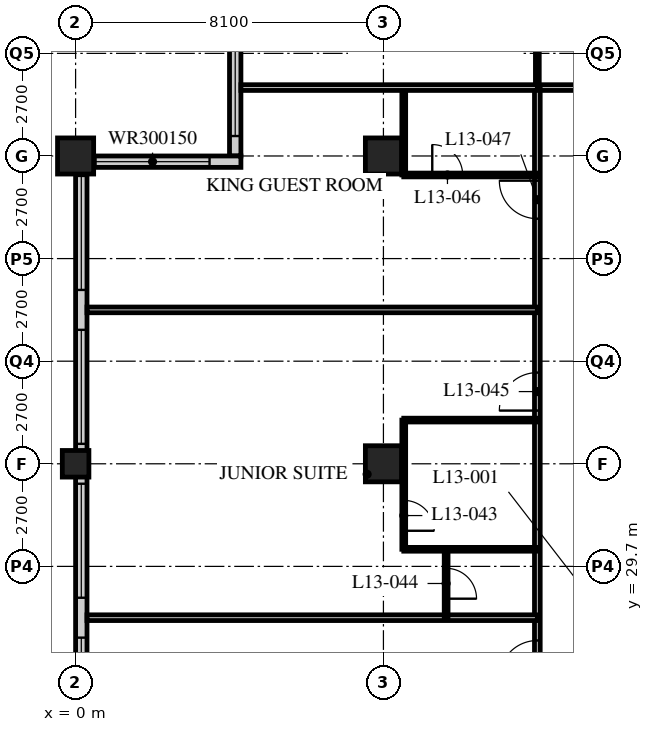
"""IFC4 building model, lengths in metres.
Left out: names, types, materials, properties, quantities, classifications, styles, units other than length and angle.
Written with IfcOpenShell. Run it as: python <this file> out.ifc"""

import sys

from ifc_helpers import new_model, si_unit, direction, frame, frame_2d, origin, origin_2d, place, context, subcontext, project, spatial, rectangle, hollow_rectangle, extrude, element, fill, save


model = new_model("IFC4")
c1 = context("Model", 3, precision=1e-05, world=origin(), true_north=direction((0.0, 1.0)))
c2 = subcontext(c1, "Body", "Model", "MODEL_VIEW")
j1 = project(units=[si_unit("LENGTHUNIT", "METRE"), si_unit("PLANEANGLEUNIT", "RADIAN")], contexts=[c1])
p1 = place(None, origin())
s1 = spatial("IfcSite", under=j1, at=p1, CompositionType="ELEMENT")
p2 = place(p1, origin())
s2 = spatial("IfcBuilding", under=s1, at=p2, CompositionType="ELEMENT")
p3 = place(p2, frame((0.0, 0.0, 56.8)))
s3 = spatial("IfcBuildingStorey", under=s2, at=p3, CompositionType="ELEMENT", Elevation=56.8)
p4 = place(p3, frame((0.0, 32.4, 0.0), z_axis=(0.0, 0.0, 1.0), x_axis=(1.0, 0.0, 0.0)))
e1 = element("IfcColumn", 1, at=p4, inside=s3, PredefinedType="COLUMN", context=c2, shape_type="SweptSolid", body=[
    extrude(hollow_rectangle(XDim=0.7, YDim=0.7, WallThickness=0.06, at=origin_2d()), origin(), (0.0, 0.0, 1.0), 3.4),
])
for number, where, z_axis, x_axis in (
    (2, (0.0, 40.5, 0.0), (0.0, 0.0, 1.0), (1.0, 0.0, 0.0)),
    (3, (8.1, 32.4, 0.0), (0.0, 0.0, 1.0), (1.0, 0.0, 0.0)),
    (4, (8.1, 40.5, 0.0), (0.0, 0.0, 1.0), (1.0, 0.0, 0.0)),
):
    element("IfcColumn", number, at=place(p3, frame(where, z_axis=z_axis, x_axis=x_axis)), inside=s3, PredefinedType="COLUMN", context=c2, shape_type="SweptSolid", body=[
        extrude(hollow_rectangle(XDim=0.95, YDim=0.95, WallThickness=0.095, at=origin_2d()), origin(), (0.0, 0.0, 1.0), 3.4),
    ])
p5 = place(p3, frame((4.2, 44.25, 0.0), z_axis=(0.0, 0.0, 1.0), x_axis=(0.0, -1.0, 0.0)))
e5 = element("IfcWall", 5, at=p5, inside=s3, PredefinedType="SOLIDWALL", context=c2, shape_type="SweptSolid", body=[
    extrude(rectangle(XDim=3.75, YDim=0.3, at=frame_2d((1.875, 0.0))), origin(), (0.0, 0.0, 1.0), 3.19),
])
p6 = place(p5, frame((0.225, 0.0, 0.9)))
e6 = element("IfcOpeningElement", 6, at=p6, cuts=e5, PredefinedType="OPENING", context=c2, shape_type="SweptSolid", body=[
    extrude(rectangle(XDim=3.0, YDim=1.5, at=frame_2d((1.5, 0.75))), frame((0.0, 0.16, 0.0), z_axis=(0.0, -1.0, 0.0), x_axis=(1.0, 0.0, 0.0)), (0.0, 0.0, 1.0), 0.32),
])
p7 = place(p3, frame((4.35, 40.35, 0.0), z_axis=(0.0, 0.0, 1.0), x_axis=(-1.0, 0.0, 0.0)))
e7 = element("IfcWall", 7, at=p7, inside=s3, PredefinedType="SOLIDWALL", context=c2, shape_type="SweptSolid", body=[
    extrude(rectangle(XDim=4.35, YDim=0.3, at=frame_2d((2.175, 0.0))), origin(), (0.0, 0.0, 1.0), 3.19),
])
p8 = place(p7, frame((0.825, 0.0, 0.9)))
e8 = element("IfcOpeningElement", 8, at=p8, cuts=e7, PredefinedType="OPENING", context=c2, shape_type="SweptSolid", body=[
    extrude(rectangle(XDim=3.0, YDim=1.5, at=frame_2d((1.5, 0.75))), frame((0.0, 0.16, 0.0), z_axis=(0.0, -1.0, 0.0), x_axis=(1.0, 0.0, 0.0)), (0.0, 0.0, 1.0), 0.32),
])
p9 = place(p3, frame((0.15, 40.2, 0.0), z_axis=(0.0, 0.0, 1.0), x_axis=(0.0, -1.0, 0.0)))
e9 = element("IfcWall", 9, at=p9, inside=s3, PredefinedType="SOLIDWALL", context=c2, shape_type="SweptSolid", body=[
    extrude(rectangle(XDim=32.1, YDim=0.3, at=frame_2d((16.05, 0.0))), origin(), (0.0, 0.0, 1.0), 3.19),
])
p10 = place(p9, frame((0.225, 0.0, 0.9)))
e10 = element("IfcOpeningElement", 10, at=p10, cuts=e9, PredefinedType="OPENING", context=c2, shape_type="SweptSolid", body=[
    extrude(rectangle(XDim=3.0, YDim=2.0, at=frame_2d((1.5, 1.0))), frame((0.0, 0.16, 0.0), z_axis=(0.0, -1.0, 0.0), x_axis=(1.0, 0.0, 0.0)), (0.0, 0.0, 1.0), 0.32),
])
p11 = place(p9, frame((4.275, 0.0, 0.9)))
e11 = element("IfcOpeningElement", 11, at=p11, cuts=e9, PredefinedType="OPENING", context=c2, shape_type="SweptSolid", body=[
    extrude(rectangle(XDim=3.0, YDim=2.0, at=frame_2d((1.5, 1.0))), frame((0.0, 0.16, 0.0), z_axis=(0.0, -1.0, 0.0), x_axis=(1.0, 0.0, 0.0)), (0.0, 0.0, 1.0), 0.32),
])
p12 = place(p9, frame((8.325, 0.0, 0.9)))
e12 = element("IfcOpeningElement", 12, at=p12, cuts=e9, PredefinedType="OPENING", context=c2, shape_type="SweptSolid", body=[
    extrude(rectangle(XDim=3.0, YDim=2.0, at=frame_2d((1.5, 1.0))), frame((0.0, 0.16, 0.0), z_axis=(0.0, -1.0, 0.0), x_axis=(1.0, 0.0, 0.0)), (0.0, 0.0, 1.0), 0.32),
])
p13 = place(p9, frame((12.375, 0.0, 0.9)))
e13 = element("IfcOpeningElement", 13, at=p13, cuts=e9, PredefinedType="OPENING", context=c2, shape_type="SweptSolid", body=[
    extrude(rectangle(XDim=3.0, YDim=2.0, at=frame_2d((1.5, 1.0))), frame((0.0, 0.16, 0.0), z_axis=(0.0, -1.0, 0.0), x_axis=(1.0, 0.0, 0.0)), (0.0, 0.0, 1.0), 0.32),
])
p14 = place(p9, frame((16.425, 0.0, 0.9)))
e14 = element("IfcOpeningElement", 14, at=p14, cuts=e9, PredefinedType="OPENING", context=c2, shape_type="SweptSolid", body=[
    extrude(rectangle(XDim=3.0, YDim=2.0, at=frame_2d((1.5, 1.0))), frame((0.0, 0.16, 0.0), z_axis=(0.0, -1.0, 0.0), x_axis=(1.0, 0.0, 0.0)), (0.0, 0.0, 1.0), 0.32),
])
p15 = place(p9, frame((20.475, 0.0, 0.9)))
e15 = element("IfcOpeningElement", 15, at=p15, cuts=e9, PredefinedType="OPENING", context=c2, shape_type="SweptSolid", body=[
    extrude(rectangle(XDim=3.0, YDim=2.0, at=frame_2d((1.5, 1.0))), frame((0.0, 0.16, 0.0), z_axis=(0.0, -1.0, 0.0), x_axis=(1.0, 0.0, 0.0)), (0.0, 0.0, 1.0), 0.32),
])
p16 = place(p9, frame((24.525, 0.0, 0.9)))
e16 = element("IfcOpeningElement", 16, at=p16, cuts=e9, PredefinedType="OPENING", context=c2, shape_type="SweptSolid", body=[
    extrude(rectangle(XDim=3.0, YDim=2.0, at=frame_2d((1.5, 1.0))), frame((0.0, 0.16, 0.0), z_axis=(0.0, -1.0, 0.0), x_axis=(1.0, 0.0, 0.0)), (0.0, 0.0, 1.0), 0.32),
])
p17 = place(p9, frame((28.575, 0.0, 0.9)))
e17 = element("IfcOpeningElement", 17, at=p17, cuts=e9, PredefinedType="OPENING", context=c2, shape_type="SweptSolid", body=[
    extrude(rectangle(XDim=3.0, YDim=2.0, at=frame_2d((1.5, 1.0))), frame((0.0, 0.16, 0.0), z_axis=(0.0, -1.0, 0.0), x_axis=(1.0, 0.0, 0.0)), (0.0, 0.0, 1.0), 0.32),
])
p18 = place(p3, frame((12.15, 42.3, 0.0), z_axis=(0.0, 0.0, 1.0), x_axis=(1.0, 0.0, 0.0)))
e18 = element("IfcWall", 18, at=p18, inside=s3, PredefinedType="PARTITIONING", context=c2, shape_type="SweptSolid", body=[
    extrude(rectangle(XDim=32.4, YDim=0.15, at=frame_2d((16.2, 0.0))), origin(), (0.0, 0.0, 1.0), 3.19),
])
p19 = place(p18, frame((6.5, 0.0, 0.0)))
e19 = element("IfcOpeningElement", 19, at=p19, cuts=e18, PredefinedType="OPENING", context=c2, shape_type="SweptSolid", body=[
    extrude(rectangle(XDim=1.0, YDim=2.1, at=frame_2d((0.5, 1.05))), frame((0.0, 0.085, 0.0), z_axis=(0.0, -1.0, 0.0), x_axis=(1.0, 0.0, 0.0)), (0.0, 0.0, 1.0), 0.17),
])
p20 = place(p18, frame((10.55, 0.0, 0.0)))
e20 = element("IfcOpeningElement", 20, at=p20, cuts=e18, PredefinedType="OPENING", context=c2, shape_type="SweptSolid", body=[
    extrude(rectangle(XDim=1.0, YDim=2.1, at=frame_2d((0.5, 1.05))), frame((0.0, 0.085, 0.0), z_axis=(0.0, -1.0, 0.0), x_axis=(1.0, 0.0, 0.0)), (0.0, 0.0, 1.0), 0.17),
])
p21 = place(p18, frame((14.6, 0.0, 0.0)))
e21 = element("IfcOpeningElement", 21, at=p21, cuts=e18, PredefinedType="OPENING", context=c2, shape_type="SweptSolid", body=[
    extrude(rectangle(XDim=1.0, YDim=2.1, at=frame_2d((0.5, 1.05))), frame((0.0, 0.085, 0.0), z_axis=(0.0, -1.0, 0.0), x_axis=(1.0, 0.0, 0.0)), (0.0, 0.0, 1.0), 0.17),
])
p22 = place(p18, frame((18.65, 0.0, 0.0)))
e22 = element("IfcOpeningElement", 22, at=p22, cuts=e18, PredefinedType="OPENING", context=c2, shape_type="SweptSolid", body=[
    extrude(rectangle(XDim=1.0, YDim=2.1, at=frame_2d((0.5, 1.05))), frame((0.0, 0.085, 0.0), z_axis=(0.0, -1.0, 0.0), x_axis=(1.0, 0.0, 0.0)), (0.0, 0.0, 1.0), 0.17),
])
p23 = place(p18, frame((22.7, 0.0, 0.0)))
e23 = element("IfcOpeningElement", 23, at=p23, cuts=e18, PredefinedType="OPENING", context=c2, shape_type="SweptSolid", body=[
    extrude(rectangle(XDim=1.0, YDim=2.1, at=frame_2d((0.5, 1.05))), frame((0.0, 0.085, 0.0), z_axis=(0.0, -1.0, 0.0), x_axis=(1.0, 0.0, 0.0)), (0.0, 0.0, 1.0), 0.17),
])
p24 = place(p18, frame((26.75, 0.0, 0.0)))
e24 = element("IfcOpeningElement", 24, at=p24, cuts=e18, PredefinedType="OPENING", context=c2, shape_type="SweptSolid", body=[
    extrude(rectangle(XDim=1.0, YDim=2.1, at=frame_2d((0.5, 1.05))), frame((0.0, 0.085, 0.0), z_axis=(0.0, -1.0, 0.0), x_axis=(1.0, 0.0, 0.0)), (0.0, 0.0, 1.0), 0.17),
])
p25 = place(p18, frame((28.775, 0.0, 0.0)))
e25 = element("IfcOpeningElement", 25, at=p25, cuts=e18, PredefinedType="OPENING", context=c2, shape_type="SweptSolid", body=[
    extrude(rectangle(XDim=1.0, YDim=2.1, at=frame_2d((0.5, 1.05))), frame((0.0, 0.085, 0.0), z_axis=(0.0, -1.0, 0.0), x_axis=(1.0, 0.0, 0.0)), (0.0, 0.0, 1.0), 0.17),
])
p26 = place(p18, frame((2.625, 0.0, 0.0)))
e26 = element("IfcOpeningElement", 26, at=p26, cuts=e18, PredefinedType="OPENING", context=c2, shape_type="SweptSolid", body=[
    extrude(rectangle(XDim=1.0, YDim=2.1, at=frame_2d((0.5, 1.05))), frame((0.0, 0.085, 0.0), z_axis=(0.0, -1.0, 0.0), x_axis=(1.0, 0.0, 0.0)), (0.0, 0.0, 1.0), 0.17),
])
p27 = place(p3, frame((12.15, 12.15, 0.0), z_axis=(0.0, 0.0, 1.0), x_axis=(0.0, 1.0, 0.0)))
e27 = element("IfcWall", 27, at=p27, inside=s3, PredefinedType="PARTITIONING", context=c2, shape_type="SweptSolid", body=[
    extrude(rectangle(XDim=30.15, YDim=0.15, at=frame_2d((15.075, 0.0))), origin(), (0.0, 0.0, 1.0), 3.19),
])
p28 = place(p27, frame((2.45, 0.0, 0.0)))
e28 = element("IfcOpeningElement", 28, at=p28, cuts=e27, PredefinedType="OPENING", context=c2, shape_type="SweptSolid", body=[
    extrude(rectangle(XDim=1.0, YDim=2.1, at=frame_2d((0.5, 1.05))), frame((0.0, 0.085, 0.0), z_axis=(0.0, -1.0, 0.0), x_axis=(1.0, 0.0, 0.0)), (0.0, 0.0, 1.0), 0.17),
])
p29 = place(p27, frame((6.5, 0.0, 0.0)))
e29 = element("IfcOpeningElement", 29, at=p29, cuts=e27, PredefinedType="OPENING", context=c2, shape_type="SweptSolid", body=[
    extrude(rectangle(XDim=1.0, YDim=2.1, at=frame_2d((0.5, 1.05))), frame((0.0, 0.085, 0.0), z_axis=(0.0, -1.0, 0.0), x_axis=(1.0, 0.0, 0.0)), (0.0, 0.0, 1.0), 0.17),
])
p30 = place(p27, frame((10.55, 0.0, 0.0)))
e30 = element("IfcOpeningElement", 30, at=p30, cuts=e27, PredefinedType="OPENING", context=c2, shape_type="SweptSolid", body=[
    extrude(rectangle(XDim=1.0, YDim=2.1, at=frame_2d((0.5, 1.05))), frame((0.0, 0.085, 0.0), z_axis=(0.0, -1.0, 0.0), x_axis=(1.0, 0.0, 0.0)), (0.0, 0.0, 1.0), 0.17),
])
p31 = place(p27, frame((14.6, 0.0, 0.0)))
e31 = element("IfcOpeningElement", 31, at=p31, cuts=e27, PredefinedType="OPENING", context=c2, shape_type="SweptSolid", body=[
    extrude(rectangle(XDim=1.0, YDim=2.1, at=frame_2d((0.5, 1.05))), frame((0.0, 0.085, 0.0), z_axis=(0.0, -1.0, 0.0), x_axis=(1.0, 0.0, 0.0)), (0.0, 0.0, 1.0), 0.17),
])
p32 = place(p27, frame((21.65, 0.0, 0.0)))
e32 = element("IfcOpeningElement", 32, at=p32, cuts=e27, PredefinedType="OPENING", context=c2, shape_type="SweptSolid", body=[
    extrude(rectangle(XDim=1.0, YDim=2.1, at=frame_2d((0.5, 1.05))), frame((0.0, 0.085, 0.0), z_axis=(0.0, -1.0, 0.0), x_axis=(1.0, 0.0, 0.0)), (0.0, 0.0, 1.0), 0.17),
])
p33 = place(p27, frame((26.7, 0.0, 0.0)))
e33 = element("IfcOpeningElement", 33, at=p33, cuts=e27, PredefinedType="OPENING", context=c2, shape_type="SweptSolid", body=[
    extrude(rectangle(XDim=1.0, YDim=2.1, at=frame_2d((0.5, 1.05))), frame((0.0, 0.085, 0.0), z_axis=(0.0, -1.0, 0.0), x_axis=(1.0, 0.0, 0.0)), (0.0, 0.0, 1.0), 0.17),
])
p34 = place(p3, frame((12.15, 28.35, 0.0), z_axis=(0.0, 0.0, 1.0), x_axis=(-1.0, 0.0, 0.0)))
e34 = element("IfcWall", 34, at=p34, inside=s3, PredefinedType="PARTITIONING", context=c2, shape_type="SweptSolid", body=[
    extrude(rectangle(XDim=11.85, YDim=0.15, at=frame_2d((5.925, 0.0))), origin(), (0.0, 0.0, 1.0), 3.19),
])
p35 = place(p3, frame((8.635, 30.15, 0.0), z_axis=(0.0, 0.0, 1.0), x_axis=(0.0, 1.0, 0.0)))
e35 = element("IfcWall", 35, at=p35, inside=s3, PredefinedType="PARTITIONING", context=c2, shape_type="SweptSolid", body=[
    extrude(rectangle(XDim=3.4, YDim=0.1, at=frame_2d((1.7, 0.0))), origin(), (0.0, 0.0, 1.0), 3.19),
])
p36 = place(p35, frame((0.488, 0.0, 0.0)))
e36 = element("IfcOpeningElement", 36, at=p36, cuts=e35, PredefinedType="OPENING", context=c2, shape_type="SweptSolid", body=[
    extrude(rectangle(XDim=0.8, YDim=2.1, at=frame_2d((0.4, 1.05))), frame((0.0, 0.06, 0.0), z_axis=(0.0, -1.0, 0.0), x_axis=(1.0, 0.0, 0.0)), (0.0, 0.0, 1.0), 0.12),
])
p37 = place(p3, frame((9.75, 28.35, 0.0), z_axis=(0.0, 0.0, 1.0), x_axis=(0.0, 1.0, 0.0)))
e37 = element("IfcWall", 37, at=p37, inside=s3, PredefinedType="PARTITIONING", context=c2, shape_type="SweptSolid", body=[
    extrude(rectangle(XDim=1.8, YDim=0.1, at=frame_2d((0.9, 0.0))), origin(), (0.0, 0.0, 1.0), 3.19),
])
p38 = place(p37, frame((0.5, 0.0, 0.0)))
e38 = element("IfcOpeningElement", 38, at=p38, cuts=e37, PredefinedType="OPENING", context=c2, shape_type="SweptSolid", body=[
    extrude(rectangle(XDim=0.8, YDim=2.1, at=frame_2d((0.4, 1.05))), frame((0.0, 0.06, 0.0), z_axis=(0.0, -1.0, 0.0), x_axis=(1.0, 0.0, 0.0)), (0.0, 0.0, 1.0), 0.12),
])
for number, where, z_axis, x_axis in (
    (39, (12.15, 30.15, 0.0), (0.0, 0.0, 1.0), (-1.0, 0.0, 0.0)),
    (40, (12.15, 33.55, 0.0), (0.0, 0.0, 1.0), (-1.0, 0.0, 0.0)),
):
    element("IfcWall", number, at=place(p3, frame(where, z_axis=z_axis, x_axis=x_axis)), inside=s3, PredefinedType="PARTITIONING", context=c2, shape_type="SweptSolid", body=[
        extrude(rectangle(XDim=3.515, YDim=0.1, at=frame_2d((1.757, 0.0))), origin(), (0.0, 0.0, 1.0), 3.19),
    ])
p39 = place(p3, frame((12.15, 36.45, 0.0), z_axis=(0.0, 0.0, 1.0), x_axis=(-1.0, 0.0, 0.0)))
e41 = element("IfcWall", 41, at=p39, inside=s3, PredefinedType="PARTITIONING", context=c2, shape_type="SweptSolid", body=[
    extrude(rectangle(XDim=11.85, YDim=0.15, at=frame_2d((5.925, 0.0))), origin(), (0.0, 0.0, 1.0), 3.19),
])
p40 = place(p3, frame((8.635, 40.0, 0.0), z_axis=(0.0, 0.0, 1.0), x_axis=(0.0, 1.0, 0.0)))
e42 = element("IfcWall", 42, at=p40, inside=s3, PredefinedType="PARTITIONING", context=c2, shape_type="SweptSolid", body=[
    extrude(rectangle(XDim=2.3, YDim=0.1, at=frame_2d((1.15, 0.0))), origin(), (0.0, 0.0, 1.0), 3.19),
])
p41 = place(p3, frame((12.15, 40.0, 0.0), z_axis=(0.0, 0.0, 1.0), x_axis=(-1.0, 0.0, 0.0)))
e43 = element("IfcWall", 43, at=p41, inside=s3, PredefinedType="PARTITIONING", context=c2, shape_type="SweptSolid", body=[
    extrude(rectangle(XDim=3.515, YDim=0.1, at=frame_2d((1.757, 0.0))), origin(), (0.0, 0.0, 1.0), 3.19),
])
p42 = place(p41, frame((1.965, 0.0, 0.0)))
e44 = element("IfcOpeningElement", 44, at=p42, cuts=e43, PredefinedType="OPENING", context=c2, shape_type="SweptSolid", body=[
    extrude(rectangle(XDim=0.8, YDim=2.1, at=frame_2d((0.4, 1.05))), frame((0.0, 0.06, 0.0), z_axis=(0.0, -1.0, 0.0), x_axis=(1.0, 0.0, 0.0)), (0.0, 0.0, 1.0), 0.12),
])
p43 = place(p3, frame((12.15, 42.3, 0.0), z_axis=(0.0, 0.0, 1.0), x_axis=(0.0, 1.0, 0.0)))
e45 = element("IfcWall", 45, at=p43, inside=s3, PredefinedType="PARTITIONING", context=c2, shape_type="SweptSolid", body=[
    extrude(rectangle(XDim=2.4, YDim=0.1, at=frame_2d((1.2, 0.0))), origin(), (0.0, 0.0, 1.0), 3.19),
])
p44 = place(p3, frame((4.35, 42.3, 0.0), z_axis=(0.0, 0.0, 1.0), x_axis=(1.0, 0.0, 0.0)))
e46 = element("IfcWall", 46, at=p44, inside=s3, PredefinedType="PARTITIONING", context=c2, shape_type="SweptSolid", body=[
    extrude(rectangle(XDim=7.8, YDim=0.15, at=frame_2d((3.9, 0.0))), origin(), (0.0, 0.0, 1.0), 3.19),
])
p45 = place(p6, origin())
e47 = element("IfcWindow", 47, at=p45, inside=s3, PartitioningType="SINGLE_PANEL", PredefinedType="WINDOW", context=c2, shape_type="SweptSolid", body=[
    extrude(rectangle(XDim=3.0, YDim=1.5, at=frame_2d((1.5, 0.75))), frame((0.0, 0.03, 0.0), z_axis=(0.0, -1.0, 0.0), x_axis=(1.0, 0.0, 0.0)), (0.0, 0.0, 1.0), 0.06),
])
fill(e6, e47)
p46 = place(p8, origin())
e48 = element("IfcWindow", 48, at=p46, inside=s3, PartitioningType="SINGLE_PANEL", PredefinedType="WINDOW", context=c2, shape_type="SweptSolid", body=[
    extrude(rectangle(XDim=3.0, YDim=1.5, at=frame_2d((1.5, 0.75))), frame((0.0, 0.03, 0.0), z_axis=(0.0, -1.0, 0.0), x_axis=(1.0, 0.0, 0.0)), (0.0, 0.0, 1.0), 0.06),
])
fill(e8, e48)
p47 = place(p10, origin())
e49 = element("IfcWindow", 49, at=p47, inside=s3, PartitioningType="SINGLE_PANEL", PredefinedType="WINDOW", context=c2, shape_type="SweptSolid", body=[
    extrude(rectangle(XDim=3.0, YDim=2.0, at=frame_2d((1.5, 1.0))), frame((0.0, 0.03, 0.0), z_axis=(0.0, -1.0, 0.0), x_axis=(1.0, 0.0, 0.0)), (0.0, 0.0, 1.0), 0.06),
])
fill(e10, e49)
p48 = place(p11, origin())
e50 = element("IfcWindow", 50, at=p48, inside=s3, PartitioningType="SINGLE_PANEL", PredefinedType="WINDOW", context=c2, shape_type="SweptSolid", body=[
    extrude(rectangle(XDim=3.0, YDim=2.0, at=frame_2d((1.5, 1.0))), frame((0.0, 0.03, 0.0), z_axis=(0.0, -1.0, 0.0), x_axis=(1.0, 0.0, 0.0)), (0.0, 0.0, 1.0), 0.06),
])
fill(e11, e50)
p49 = place(p12, origin())
e51 = element("IfcWindow", 51, at=p49, inside=s3, PartitioningType="SINGLE_PANEL", PredefinedType="WINDOW", context=c2, shape_type="SweptSolid", body=[
    extrude(rectangle(XDim=3.0, YDim=2.0, at=frame_2d((1.5, 1.0))), frame((0.0, 0.03, 0.0), z_axis=(0.0, -1.0, 0.0), x_axis=(1.0, 0.0, 0.0)), (0.0, 0.0, 1.0), 0.06),
])
fill(e12, e51)
p50 = place(p13, origin())
e52 = element("IfcWindow", 52, at=p50, inside=s3, PartitioningType="SINGLE_PANEL", PredefinedType="WINDOW", context=c2, shape_type="SweptSolid", body=[
    extrude(rectangle(XDim=3.0, YDim=2.0, at=frame_2d((1.5, 1.0))), frame((0.0, 0.03, 0.0), z_axis=(0.0, -1.0, 0.0), x_axis=(1.0, 0.0, 0.0)), (0.0, 0.0, 1.0), 0.06),
])
fill(e13, e52)
p51 = place(p31, origin())
e53 = element("IfcDoor", 53, at=p51, inside=s3, OperationType="SINGLE_SWING_LEFT", PredefinedType="DOOR", context=c2, shape_type="SweptSolid", body=[
    extrude(rectangle(XDim=1.0, YDim=2.1, at=frame_2d((0.5, 1.05))), frame((0.0, 0.025, 0.0), z_axis=(0.0, -1.0, 0.0), x_axis=(1.0, 0.0, 0.0)), (0.0, 0.0, 1.0), 0.05),
])
fill(e31, e53)
p52 = place(p36, origin())
e54 = element("IfcDoor", 54, at=p52, inside=s3, OperationType="SINGLE_SWING_RIGHT", PredefinedType="DOOR", context=c2, shape_type="SweptSolid", body=[
    extrude(rectangle(XDim=0.8, YDim=2.1, at=frame_2d((0.4, 1.05))), frame((0.0, 0.025, 0.0), z_axis=(0.0, -1.0, 0.0), x_axis=(1.0, 0.0, 0.0)), (0.0, 0.0, 1.0), 0.05),
])
fill(e36, e54)
p53 = place(p38, origin())
e55 = element("IfcDoor", 55, at=p53, inside=s3, OperationType="SINGLE_SWING_RIGHT", PredefinedType="DOOR", context=c2, shape_type="SweptSolid", body=[
    extrude(rectangle(XDim=0.8, YDim=2.1, at=frame_2d((0.4, 1.05))), frame((0.0, 0.025, 0.0), z_axis=(0.0, -1.0, 0.0), x_axis=(1.0, 0.0, 0.0)), (0.0, 0.0, 1.0), 0.05),
])
fill(e38, e55)
p54 = place(p32, origin())
e56 = element("IfcDoor", 56, at=p54, inside=s3, OperationType="SINGLE_SWING_LEFT", PredefinedType="DOOR", context=c2, shape_type="SweptSolid", body=[
    extrude(rectangle(XDim=1.0, YDim=2.1, at=frame_2d((0.5, 1.05))), frame((0.0, 0.025, 0.0), z_axis=(0.0, -1.0, 0.0), x_axis=(1.0, 0.0, 0.0)), (0.0, 0.0, 1.0), 0.05),
])
fill(e32, e56)
p55 = place(p42, origin())
e57 = element("IfcDoor", 57, at=p55, inside=s3, OperationType="SINGLE_SWING_LEFT", PredefinedType="DOOR", context=c2, shape_type="SweptSolid", body=[
    extrude(rectangle(XDim=0.8, YDim=2.1, at=frame_2d((0.4, 1.05))), frame((0.0, 0.025, 0.0), z_axis=(0.0, -1.0, 0.0), x_axis=(1.0, 0.0, 0.0)), (0.0, 0.0, 1.0), 0.05),
])
fill(e44, e57)
p56 = place(p33, origin())
e58 = element("IfcDoor", 58, at=p56, inside=s3, OperationType="SINGLE_SWING_RIGHT", PredefinedType="DOOR", context=c2, shape_type="SweptSolid", body=[
    extrude(rectangle(XDim=1.0, YDim=2.1, at=frame_2d((0.5, 1.05))), frame((0.0, 0.025, 0.0), z_axis=(0.0, -1.0, 0.0), x_axis=(1.0, 0.0, 0.0)), (0.0, 0.0, 1.0), 0.05),
])
fill(e33, e58)
save(model, sys.argv[1])
